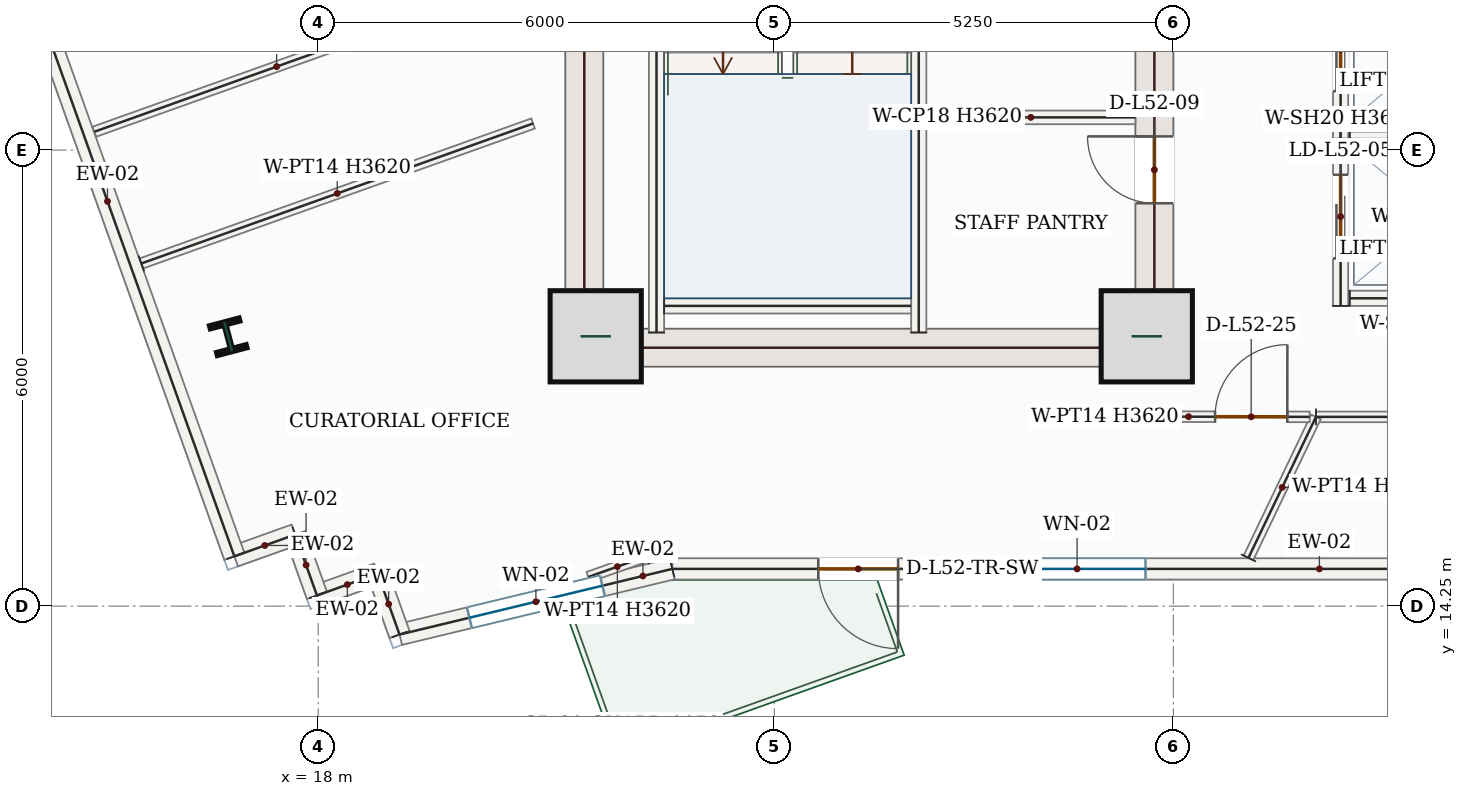
"""IFC4 building model, lengths in metres.
Left out: names, types, materials, properties, quantities, classifications, styles, units other than length and angle.
Written with IfcOpenShell. Run it as: python <this file> out.ifc"""

import sys

from ifc_helpers import new_model, si_unit, direction, frame, frame_2d, origin, origin_2d, place, context, subcontext, project, spatial, rectangle, i_section, extrude, source, transform, mapped, element, fill, save


model = new_model("IFC4")
c1 = context("Model", 3, precision=1e-05, world=origin(), true_north=direction((0.0, 1.0)))
c2 = subcontext(c1, "Body", "Model", "MODEL_VIEW")
j1 = project(units=[si_unit("LENGTHUNIT", "METRE"), si_unit("PLANEANGLEUNIT", "RADIAN")], contexts=[c1])
p1 = place(None, origin())
s1 = spatial("IfcSite", under=j1, at=p1, CompositionType="ELEMENT")
p2 = place(p1, origin())
s2 = spatial("IfcBuilding", under=s1, at=p2, CompositionType="ELEMENT")
p3 = place(p2, frame((0.0, 0.0, 221.4)))
s3 = spatial("IfcBuildingStorey", under=s2, at=p3, CompositionType="ELEMENT", Elevation=221.4)
m1 = source(origin(), c2, "Body", "SweptSolid", [
    extrude(rectangle(XDim=8.55, YDim=0.5, at=frame_2d((4.275, 0.0))), origin(), (0.0, 0.0, 1.0), 3.62),
])
p4 = place(p3, frame((21.5, 17.4, 0.0), z_axis=(0.0, 0.0, 1.0), x_axis=(0.0, 1.0, 0.0)))
e1 = element("IfcWall", 1, at=p4, inside=s3, PredefinedType="SHEAR", context=c2, shape_type="MappedRepresentation", body=[
    mapped(m1, transform((0.0, 0.0, 0.0), x_axis=(1.0, 0.0, 0.0), y_axis=(0.0, 1.0, 0.0), z_axis=(0.0, 0.0, 1.0), scale=1.0)),
])
p5 = place(p3, frame((29.0, 17.4, 0.0), z_axis=(0.0, 0.0, 1.0), x_axis=(0.0, 1.0, 0.0)))
e2 = element("IfcWall", 2, at=p5, inside=s3, PredefinedType="SHEAR", context=c2, shape_type="SweptSolid", body=[
    extrude(rectangle(XDim=8.55, YDim=0.5, at=frame_2d((4.275, 0.0))), origin(), (0.0, 0.0, 1.0), 3.62),
])
p6 = place(p5, frame((6.65, 0.0, 0.0)))
e3 = element("IfcOpeningElement", 3, at=p6, cuts=e2, PredefinedType="OPENING", context=c2, shape_type="SweptSolid", body=[
    extrude(rectangle(XDim=1.1, YDim=2.2, at=frame_2d((0.55, 1.1))), frame((0.0, 0.26, 0.0), z_axis=(0.0, -1.0, 0.0), x_axis=(1.0, 0.0, 0.0)), (0.0, 0.0, 1.0), 0.52),
])
p7 = place(p5, frame((2.15, 0.0, 0.0)))
e4 = element("IfcOpeningElement", 4, at=p7, cuts=e2, PredefinedType="OPENING", context=c2, shape_type="SweptSolid", body=[
    extrude(rectangle(XDim=0.88, YDim=2.1, at=frame_2d((0.44, 1.05))), frame((0.0, 0.26, 0.0), z_axis=(0.0, -1.0, 0.0), x_axis=(1.0, 0.0, 0.0)), (0.0, 0.0, 1.0), 0.52),
])
p8 = place(p5, frame((4.25, 0.0, 0.0)))
e5 = element("IfcOpeningElement", 5, at=p8, cuts=e2, PredefinedType="OPENING", context=c2, shape_type="SweptSolid", body=[
    extrude(rectangle(XDim=0.88, YDim=2.1, at=frame_2d((0.44, 1.05))), frame((0.0, 0.26, 0.0), z_axis=(0.0, -1.0, 0.0), x_axis=(1.0, 0.0, 0.0)), (0.0, 0.0, 1.0), 0.52),
])
m2 = source(origin(), c2, "Body", "SweptSolid", [
    extrude(rectangle(XDim=7.0, YDim=0.5, at=frame_2d((3.5, 0.0))), origin(), (0.0, 0.0, 1.0), 3.62),
])
p9 = place(p3, frame((21.75, 17.65, 0.0), z_axis=(0.0, 0.0, 1.0), x_axis=(1.0, 0.0, 0.0)))
e6 = element("IfcWall", 6, at=p9, inside=s3, PredefinedType="SHEAR", context=c2, shape_type="MappedRepresentation", body=[
    mapped(m2, transform((0.0, 0.0, 0.0), x_axis=(1.0, 0.0, 0.0), y_axis=(0.0, 1.0, 0.0), z_axis=(0.0, 0.0, 1.0), scale=1.0)),
])
m3 = source(origin(), c2, "Body", "SweptSolid", [
    extrude(rectangle(XDim=1.2, YDim=1.2, at=origin_2d()), origin(), (0.0, 0.0, 1.0), 3.9),
])
for number, where, z_axis, x_axis in (
    (7, (21.65, 17.8, 0.0), (0.0, 0.0, 1.0), (1.0, 0.0, 0.0)),
    (8, (28.9, 17.8, 0.0), (0.0, 0.0, 1.0), (1.0, 0.0, 0.0)),
):
    element("IfcColumn", number, at=place(p3, frame(where, z_axis=z_axis, x_axis=x_axis)), inside=s3, PredefinedType="COLUMN", context=c2, shape_type="MappedRepresentation", body=[
        mapped(m3, transform((0.0, 0.0, 0.0), x_axis=(1.0, 0.0, 0.0), y_axis=(0.0, 1.0, 0.0), z_axis=(0.0, 0.0, 1.0), scale=1.0)),
    ])
m4 = source(origin(), c2, "Body", "SweptSolid", [
    extrude(i_section(OverallWidth=0.404, OverallDepth=0.407, WebThickness=0.027, FlangeThickness=0.044, FilletRadius=0.018, at=origin_2d()), origin(), (0.0, 0.0, 1.0), 3.9),
])
p10 = place(p3, frame((16.815, 17.794, 0.0), z_axis=(0.0, 0.0, 1.0), x_axis=(0.966823388604, 0.255445757936, 0.0)))
e9 = element("IfcColumn", 9, at=p10, inside=s3, PredefinedType="COLUMN", context=c2, shape_type="MappedRepresentation", body=[
    mapped(m4, transform((0.0, 0.0, 0.0), x_axis=(1.0, 0.0, 0.0), y_axis=(0.0, 1.0, 0.0), z_axis=(0.0, 0.0, 1.0), scale=1.0)),
])
p11 = place(p3, frame((33.309, 14.74, 0.0), z_axis=(0.0, 0.0, 1.0), x_axis=(-1.0, 0.0, 0.0)))
e10 = element("IfcWall", 10, at=p11, inside=s3, PredefinedType="SOLIDWALL", context=c2, shape_type="SweptSolid", body=[
    extrude(rectangle(XDim=10.651, YDim=0.28, at=frame_2d((5.326, 0.0))), origin(), (0.0, 0.0, 1.0), 3.62),
])
p12 = place(p11, frame((7.681, 0.0, 0.0)))
e11 = element("IfcOpeningElement", 11, at=p12, cuts=e10, PredefinedType="OPENING", context=c2, shape_type="SweptSolid", body=[
    extrude(rectangle(XDim=1.05, YDim=2.15, at=frame_2d((0.525, 1.075))), frame((0.0, 0.15, 0.0), z_axis=(0.0, -1.0, 0.0), x_axis=(1.0, 0.0, 0.0)), (0.0, 0.0, 1.0), 0.3),
])
p13 = place(p11, frame((4.426, 0.0, 0.85)))
e12 = element("IfcOpeningElement", 12, at=p13, cuts=e10, PredefinedType="OPENING", context=c2, shape_type="SweptSolid", body=[
    extrude(rectangle(XDim=1.8, YDim=1.75, at=frame_2d((0.9, 0.875))), frame((0.0, 0.15, 0.0), z_axis=(0.0, -1.0, 0.0), x_axis=(1.0, 0.0, 0.0)), (0.0, 0.0, 1.0), 0.3),
])
p14 = place(p3, frame((22.658, 14.74, 0.0), z_axis=(0.0, 0.0, 1.0), x_axis=(-0.972237013355, -0.233998268929, 0.0)))
e13 = element("IfcWall", 13, at=p14, inside=s3, PredefinedType="SOLIDWALL", context=c2, shape_type="SweptSolid", body=[
    extrude(rectangle(XDim=3.691, YDim=0.28, at=frame_2d((1.846, 0.0))), origin(), (0.0, 0.0, 1.0), 3.62),
])
p15 = place(p14, frame((0.946, 0.0, 0.85)))
e14 = element("IfcOpeningElement", 14, at=p15, cuts=e13, PredefinedType="OPENING", context=c2, shape_type="SweptSolid", body=[
    extrude(rectangle(XDim=1.8, YDim=1.75, at=frame_2d((0.9, 0.875))), frame((0.0, 0.15, 0.0), z_axis=(0.0, -1.0, 0.0), x_axis=(1.0, 0.0, 0.0)), (0.0, 0.0, 1.0), 0.3),
])
m5 = source(origin(), c2, "Body", "SweptSolid", [
    extrude(rectangle(XDim=0.85, YDim=0.28, at=frame_2d((0.425, 0.0))), origin(), (0.0, 0.0, 1.0), 3.62),
])
p16 = place(p3, frame((19.069, 13.876, 0.0), z_axis=(0.0, 0.0, 1.0), x_axis=(-0.336481891926, 0.941689936447, 0.0)))
e15 = element("IfcWall", 15, at=p16, inside=s3, PredefinedType="SOLIDWALL", context=c2, shape_type="MappedRepresentation", body=[
    mapped(m5, transform((0.0, 0.0, 0.0), x_axis=(1.0, 0.0, 0.0), y_axis=(0.0, 1.0, 0.0), z_axis=(0.0, 0.0, 1.0), scale=1.0)),
])
m6 = source(origin(), c2, "Body", "SweptSolid", [
    extrude(rectangle(XDim=0.85, YDim=0.28, at=frame_2d((0.425, 0.0))), origin(), (0.0, 0.0, 1.0), 3.62),
])
for number, where, z_axis, x_axis in (
    (16, (18.783, 14.677, 0.0), (0.0, 0.0, 1.0), (-0.942, -0.337, 0.0)),
    (17, (17.983, 14.391, 0.0), (0.0, 0.0, 1.0), (-0.337, 0.942, 0.0)),
):
    element("IfcWall", number, at=place(p3, frame(where, z_axis=z_axis, x_axis=x_axis)), inside=s3, PredefinedType="SOLIDWALL", context=c2, shape_type="MappedRepresentation", body=[
        mapped(m6, transform((0.0, 0.0, 0.0), x_axis=(1.0, 0.0, 0.0), y_axis=(0.0, 1.0, 0.0), z_axis=(0.0, 0.0, 1.0), scale=1.0)),
    ])
m7 = source(origin(), c2, "Body", "SweptSolid", [
    extrude(rectangle(XDim=0.85, YDim=0.28, at=frame_2d((0.425, 0.0))), origin(), (0.0, 0.0, 1.0), 3.62),
])
p17 = place(p3, frame((17.697, 15.191, 0.0), z_axis=(0.0, 0.0, 1.0), x_axis=(-0.941657417713, -0.336572886112, 0.0)))
e18 = element("IfcWall", 18, at=p17, inside=s3, PredefinedType="SOLIDWALL", context=c2, shape_type="MappedRepresentation", body=[
    mapped(m7, transform((0.0, 0.0, 0.0), x_axis=(1.0, 0.0, 0.0), y_axis=(0.0, 1.0, 0.0), z_axis=(0.0, 0.0, 1.0), scale=1.0)),
])
m8 = source(origin(), c2, "Body", "SweptSolid", [
    extrude(rectangle(XDim=9.92, YDim=0.28, at=frame_2d((4.96, 0.0))), origin(), (0.0, 0.0, 1.0), 3.62),
])
p18 = place(p3, frame((16.896, 14.905, 0.0), z_axis=(0.0, 0.0, 1.0), x_axis=(-0.336532833412, 0.941671732631, 0.0)))
e19 = element("IfcWall", 19, at=p18, inside=s3, PredefinedType="SOLIDWALL", context=c2, shape_type="MappedRepresentation", body=[
    mapped(m8, transform((0.0, 0.0, 0.0), x_axis=(1.0, 0.0, 0.0), y_axis=(0.0, 1.0, 0.0), z_axis=(0.0, 0.0, 1.0), scale=1.0)),
])
m9 = source(origin(), c2, "Body", "SweptSolid", [
    extrude(rectangle(XDim=7.87, YDim=0.2, at=frame_2d((3.935, 0.0))), origin(), (0.0, 0.0, 1.0), 3.62),
])
p19 = place(p3, frame((22.45, 17.85, 0.0), z_axis=(0.0, 0.0, 1.0), x_axis=(0.0, 1.0, 0.0)))
e20 = element("IfcWall", 20, at=p19, inside=s3, PredefinedType="SOLIDWALL", context=c2, shape_type="MappedRepresentation", body=[
    mapped(m9, transform((0.0, 0.0, 0.0), x_axis=(1.0, 0.0, 0.0), y_axis=(0.0, 1.0, 0.0), z_axis=(0.0, 0.0, 1.0), scale=1.0)),
])
p20 = place(p3, frame((25.9, 17.85, 0.0), z_axis=(0.0, 0.0, 1.0), x_axis=(0.0, 1.0, 0.0)))
e21 = element("IfcWall", 21, at=p20, inside=s3, PredefinedType="SOLIDWALL", context=c2, shape_type="SweptSolid", body=[
    extrude(rectangle(XDim=8.0, YDim=0.2, at=frame_2d((4.0, 0.0))), origin(), (0.0, 0.0, 1.0), 3.62),
])
p21 = place(p20, frame((6.3, 0.0, 0.0)))
e22 = element("IfcOpeningElement", 22, at=p21, cuts=e21, PredefinedType="OPENING", context=c2, shape_type="SweptSolid", body=[
    extrude(rectangle(XDim=1.05, YDim=2.15, at=frame_2d((0.525, 1.075))), frame((0.0, 0.11, 0.0), z_axis=(0.0, -1.0, 0.0), x_axis=(1.0, 0.0, 0.0)), (0.0, 0.0, 1.0), 0.22),
])
m10 = source(origin(), c2, "Body", "SweptSolid", [
    extrude(rectangle(XDim=3.25, YDim=0.2, at=frame_2d((1.625, 0.0))), origin(), (0.0, 0.0, 1.0), 3.62),
])
p22 = place(p3, frame((22.55, 18.2, 0.0), z_axis=(0.0, 0.0, 1.0), x_axis=(1.0, 0.0, 0.0)))
e23 = element("IfcWall", 23, at=p22, inside=s3, PredefinedType="SOLIDWALL", context=c2, shape_type="MappedRepresentation", body=[
    mapped(m10, transform((0.0, 0.0, 0.0), x_axis=(1.0, 0.0, 0.0), y_axis=(0.0, 1.0, 0.0), z_axis=(0.0, 0.0, 1.0), scale=1.0)),
])
m11 = source(origin(), c2, "Body", "SweptSolid", [
    extrude(rectangle(XDim=2.75, YDim=0.18, at=frame_2d((1.375, 0.0))), origin(), (0.0, 0.0, 1.0), 3.62),
])
p23 = place(p3, frame((26.0, 20.68, 0.0), z_axis=(0.0, 0.0, 1.0), x_axis=(1.0, 0.0, 0.0)))
e24 = element("IfcWall", 24, at=p23, inside=s3, PredefinedType="PARTITIONING", context=c2, shape_type="MappedRepresentation", body=[
    mapped(m11, transform((0.0, 0.0, 0.0), x_axis=(1.0, 0.0, 0.0), y_axis=(0.0, 1.0, 0.0), z_axis=(0.0, 0.0, 1.0), scale=1.0)),
])
p24 = place(p3, frame((31.45, 20.4, 0.0), z_axis=(0.0, 0.0, 1.0), x_axis=(0.0, 1.0, 0.0)))
e25 = element("IfcWall", 25, at=p24, inside=s3, PredefinedType="SOLIDWALL", context=c2, shape_type="SweptSolid", body=[
    extrude(rectangle(XDim=2.35, YDim=0.2, at=frame_2d((1.175, 0.0))), origin(), (0.0, 0.0, 1.0), 3.62),
])
p25 = place(p24, frame((0.625, 0.0, 0.0)))
e26 = element("IfcOpeningElement", 26, at=p25, cuts=e25, PredefinedType="OPENING", context=c2, shape_type="SweptSolid", body=[
    extrude(rectangle(XDim=1.1, YDim=2.15, at=frame_2d((0.55, 1.075))), frame((0.0, 0.11, 0.0), z_axis=(0.0, -1.0, 0.0), x_axis=(1.0, 0.0, 0.0)), (0.0, 0.0, 1.0), 0.22),
])
m12 = source(origin(), c2, "Body", "SweptSolid", [
    extrude(rectangle(XDim=2.26, YDim=0.2, at=frame_2d((1.13, 0.0))), origin(), (0.0, 0.0, 1.0), 3.62),
])
p26 = place(p3, frame((31.57, 20.5, 0.0), z_axis=(0.0, 0.0, 1.0), x_axis=(1.0, 0.0, 0.0)))
e27 = element("IfcWall", 27, at=p26, inside=s3, PredefinedType="SOLIDWALL", context=c2, shape_type="MappedRepresentation", body=[
    mapped(m12, transform((0.0, 0.0, 0.0), x_axis=(1.0, 0.0, 0.0), y_axis=(0.0, 1.0, 0.0), z_axis=(0.0, 0.0, 1.0), scale=1.0)),
])
p27 = place(p3, frame((31.45, 18.2, 0.0), z_axis=(0.0, 0.0, 1.0), x_axis=(0.0, 1.0, 0.0)))
e28 = element("IfcWall", 28, at=p27, inside=s3, PredefinedType="SOLIDWALL", context=c2, shape_type="SweptSolid", body=[
    extrude(rectangle(XDim=2.35, YDim=0.2, at=frame_2d((1.175, 0.0))), origin(), (0.0, 0.0, 1.0), 3.62),
])
p28 = place(p27, frame((0.625, 0.0, 0.0)))
e29 = element("IfcOpeningElement", 29, at=p28, cuts=e28, PredefinedType="OPENING", context=c2, shape_type="SweptSolid", body=[
    extrude(rectangle(XDim=1.1, YDim=2.15, at=frame_2d((0.55, 1.075))), frame((0.0, 0.11, 0.0), z_axis=(0.0, -1.0, 0.0), x_axis=(1.0, 0.0, 0.0)), (0.0, 0.0, 1.0), 0.22),
])
p29 = place(p3, frame((31.57, 18.3, 0.0), z_axis=(0.0, 0.0, 1.0), x_axis=(1.0, 0.0, 0.0)))
e30 = element("IfcWall", 30, at=p29, inside=s3, PredefinedType="SOLIDWALL", context=c2, shape_type="MappedRepresentation", body=[
    mapped(m12, transform((0.0, 0.0, 0.0), x_axis=(1.0, 0.0, 0.0), y_axis=(0.0, 1.0, 0.0), z_axis=(0.0, 0.0, 1.0), scale=1.0)),
])
m13 = source(origin(), c2, "Body", "SweptSolid", [
    extrude(rectangle(XDim=5.093, YDim=0.14, at=frame_2d((2.547, 0.0))), origin(), (0.0, 0.0, 1.0), 3.62),
])
p30 = place(p3, frame((19.85, 22.205, 0.0), z_axis=(0.0, 0.0, 1.0), x_axis=(-0.941667058904, -0.336545910947, 0.0)))
e31 = element("IfcWall", 31, at=p30, inside=s3, PredefinedType="PARTITIONING", context=c2, shape_type="MappedRepresentation", body=[
    mapped(m13, transform((0.0, 0.0, 0.0), x_axis=(1.0, 0.0, 0.0), y_axis=(0.0, 1.0, 0.0), z_axis=(0.0, 0.0, 1.0), scale=1.0)),
])
p31 = place(p3, frame((31.126, 16.74, 0.0), z_axis=(0.0, 0.0, 1.0), x_axis=(1.0, 0.0, 0.0)))
e32 = element("IfcWall", 32, at=p31, inside=s3, PredefinedType="PARTITIONING", context=c2, shape_type="SweptSolid", body=[
    extrude(rectangle(XDim=7.564, YDim=0.14, at=frame_2d((3.782, 0.0))), origin(), (0.0, 0.0, 1.0), 3.62),
])
p32 = place(p31, frame((4.299, 0.0, 0.0)))
e33 = element("IfcOpeningElement", 33, at=p32, cuts=e32, PredefinedType="OPENING", context=c2, shape_type="SweptSolid", body=[
    extrude(rectangle(XDim=0.95, YDim=2.15, at=frame_2d((0.475, 1.075))), frame((0.0, 0.08, 0.0), z_axis=(0.0, -1.0, 0.0), x_axis=(1.0, 0.0, 0.0)), (0.0, 0.0, 1.0), 0.16),
])
m14 = source(origin(), c2, "Body", "SweptSolid", [
    extrude(rectangle(XDim=2.057, YDim=0.14, at=frame_2d((1.028, 0.0))), origin(), (0.0, 0.0, 1.0), 3.62),
])
p33 = place(p3, frame((30.237, 14.885, 0.0), z_axis=(0.0, 0.0, 1.0), x_axis=(0.43214833388, 0.90180253799, 0.0)))
e34 = element("IfcWall", 34, at=p33, inside=s3, PredefinedType="PARTITIONING", context=c2, shape_type="MappedRepresentation", body=[
    mapped(m14, transform((0.0, 0.0, 0.0), x_axis=(1.0, 0.0, 0.0), y_axis=(0.0, 1.0, 0.0), z_axis=(0.0, 0.0, 1.0), scale=1.0)),
])
p34 = place(p3, frame((29.252, 16.743, 0.0), z_axis=(0.0, 0.0, 1.0), x_axis=(0.999998876126, -0.00149924869, 0.0)))
e35 = element("IfcWall", 35, at=p34, inside=s3, PredefinedType="PARTITIONING", context=c2, shape_type="SweptSolid", body=[
    extrude(rectangle(XDim=1.791, YDim=0.14, at=frame_2d((0.896, 0.0))), origin(), (0.0, 0.0, 1.0), 3.62),
])
p35 = place(p34, frame((0.547, 0.0, 0.0)))
e36 = element("IfcOpeningElement", 36, at=p35, cuts=e35, PredefinedType="OPENING", context=c2, shape_type="SweptSolid", body=[
    extrude(rectangle(XDim=0.95, YDim=2.15, at=frame_2d((0.475, 1.075))), frame((0.0, 0.08, 0.0), z_axis=(0.0, -1.0, 0.0), x_axis=(1.0, 0.0, 0.0)), (0.0, 0.0, 1.0), 0.16),
])
m15 = source(origin(), c2, "Body", "SweptSolid", [
    extrude(rectangle(XDim=0.812, YDim=0.14, at=frame_2d((0.406, 0.0))), origin(), (0.0, 0.0, 1.0), 3.62),
])
p36 = place(p3, frame((22.317, 14.906, 0.0), z_axis=(0.0, 0.0, 1.0), x_axis=(-0.942047844385, -0.335478552057, 0.0)))
e37 = element("IfcWall", 37, at=p36, inside=s3, PredefinedType="PARTITIONING", context=c2, shape_type="MappedRepresentation", body=[
    mapped(m15, transform((0.0, 0.0, 0.0), x_axis=(1.0, 0.0, 0.0), y_axis=(0.0, 1.0, 0.0), z_axis=(0.0, 0.0, 1.0), scale=1.0)),
])
m16 = source(origin(), c2, "Body", "SweptSolid", [
    extrude(rectangle(XDim=5.473, YDim=0.14, at=frame_2d((2.736, 0.0))), origin(), (0.0, 0.0, 1.0), 3.62),
])
p37 = place(p3, frame((15.673, 18.758, 0.0), z_axis=(0.0, 0.0, 1.0), x_axis=(0.941665179086, 0.336551170695, 0.0)))
e38 = element("IfcWall", 38, at=p37, inside=s3, PredefinedType="PARTITIONING", context=c2, shape_type="MappedRepresentation", body=[
    mapped(m16, transform((0.0, 0.0, 0.0), x_axis=(1.0, 0.0, 0.0), y_axis=(0.0, 1.0, 0.0), z_axis=(0.0, 0.0, 1.0), scale=1.0)),
])
m17 = source(origin(), c2, "Body", "SweptSolid", [
    extrude(rectangle(XDim=1.05, YDim=2.15, at=frame_2d((0.525, 1.075))), frame((0.0, 0.025, 0.0), z_axis=(0.0, -1.0, 0.0), x_axis=(1.0, 0.0, 0.0)), (0.0, 0.0, 1.0), 0.05),
])
p38 = place(p12, origin())
e39 = element("IfcDoor", 39, at=p38, inside=s3, OperationType="SINGLE_SWING_LEFT", PredefinedType="DOOR", context=c2, shape_type="MappedRepresentation", body=[
    mapped(m17, transform((0.0, 0.0, 0.0), x_axis=(1.0, 0.0, 0.0), y_axis=(0.0, 1.0, 0.0), z_axis=(0.0, 0.0, 1.0), scale=1.0)),
])
fill(e11, e39)
m18 = source(origin(), c2, "Body", "SweptSolid", [
    extrude(rectangle(XDim=1.8, YDim=1.75, at=frame_2d((0.9, 0.875))), frame((0.0, 0.03, 0.0), z_axis=(0.0, -1.0, 0.0), x_axis=(1.0, 0.0, 0.0)), (0.0, 0.0, 1.0), 0.06),
])
p39 = place(p13, origin())
e40 = element("IfcWindow", 40, at=p39, inside=s3, PartitioningType="DOUBLE_PANEL_VERTICAL", PredefinedType="WINDOW", context=c2, shape_type="MappedRepresentation", body=[
    mapped(m18, transform((0.0, 0.0, 0.0), x_axis=(1.0, 0.0, 0.0), y_axis=(0.0, 1.0, 0.0), z_axis=(0.0, 0.0, 1.0), scale=1.0)),
])
fill(e12, e40)
p40 = place(p15, origin())
e41 = element("IfcWindow", 41, at=p40, inside=s3, PartitioningType="DOUBLE_PANEL_VERTICAL", PredefinedType="WINDOW", context=c2, shape_type="MappedRepresentation", body=[
    mapped(m18, transform((0.0, 0.0, 0.0), x_axis=(1.0, 0.0, 0.0), y_axis=(0.0, 1.0, 0.0), z_axis=(0.0, 0.0, 1.0), scale=1.0)),
])
fill(e14, e41)
m19 = source(origin(), c2, "Body", "SweptSolid", [
    extrude(rectangle(XDim=0.88, YDim=2.1, at=frame_2d((0.44, 1.05))), frame((0.0, 0.025, 0.0), z_axis=(0.0, -1.0, 0.0), x_axis=(1.0, 0.0, 0.0)), (0.0, 0.0, 1.0), 0.05),
])
p41 = place(p7, origin())
e42 = element("IfcDoor", 42, at=p41, inside=s3, OperationType="SINGLE_SWING_RIGHT", PredefinedType="DOOR", context=c2, shape_type="MappedRepresentation", body=[
    mapped(m19, transform((0.0, 0.0, 0.0), x_axis=(1.0, 0.0, 0.0), y_axis=(0.0, 1.0, 0.0), z_axis=(0.0, 0.0, 1.0), scale=1.0)),
])
fill(e4, e42)
m20 = source(origin(), c2, "Body", "SweptSolid", [
    extrude(rectangle(XDim=1.1, YDim=2.15, at=frame_2d((0.55, 1.075))), frame((0.0, 0.025, 0.0), z_axis=(0.0, -1.0, 0.0), x_axis=(1.0, 0.0, 0.0)), (0.0, 0.0, 1.0), 0.05),
])
p42 = place(p25, origin())
e43 = element("IfcDoor", 43, at=p42, inside=s3, OperationType="DOUBLE_DOOR_SLIDING", PredefinedType="DOOR", context=c2, shape_type="MappedRepresentation", body=[
    mapped(m20, transform((0.0, 0.0, 0.0), x_axis=(1.0, 0.0, 0.0), y_axis=(0.0, 1.0, 0.0), z_axis=(0.0, 0.0, 1.0), scale=1.0)),
])
fill(e26, e43)
p43 = place(p28, origin())
e44 = element("IfcDoor", 44, at=p43, inside=s3, OperationType="DOUBLE_DOOR_SLIDING", PredefinedType="DOOR", context=c2, shape_type="MappedRepresentation", body=[
    mapped(m20, transform((0.0, 0.0, 0.0), x_axis=(1.0, 0.0, 0.0), y_axis=(0.0, 1.0, 0.0), z_axis=(0.0, 0.0, 1.0), scale=1.0)),
])
fill(e29, e44)
m21 = source(origin(), c2, "Body", "SweptSolid", [
    extrude(rectangle(XDim=0.95, YDim=2.15, at=frame_2d((0.475, 1.075))), frame((0.0, 0.025, 0.0), z_axis=(0.0, -1.0, 0.0), x_axis=(1.0, 0.0, 0.0)), (0.0, 0.0, 1.0), 0.05),
])
p44 = place(p35, origin())
e45 = element("IfcDoor", 45, at=p44, inside=s3, OperationType="SINGLE_SWING_RIGHT", PredefinedType="DOOR", context=c2, shape_type="MappedRepresentation", body=[
    mapped(m21, transform((0.0, 0.0, 0.0), x_axis=(1.0, 0.0, 0.0), y_axis=(0.0, 1.0, 0.0), z_axis=(0.0, 0.0, 1.0), scale=1.0)),
])
fill(e36, e45)
save(model, sys.argv[1])
